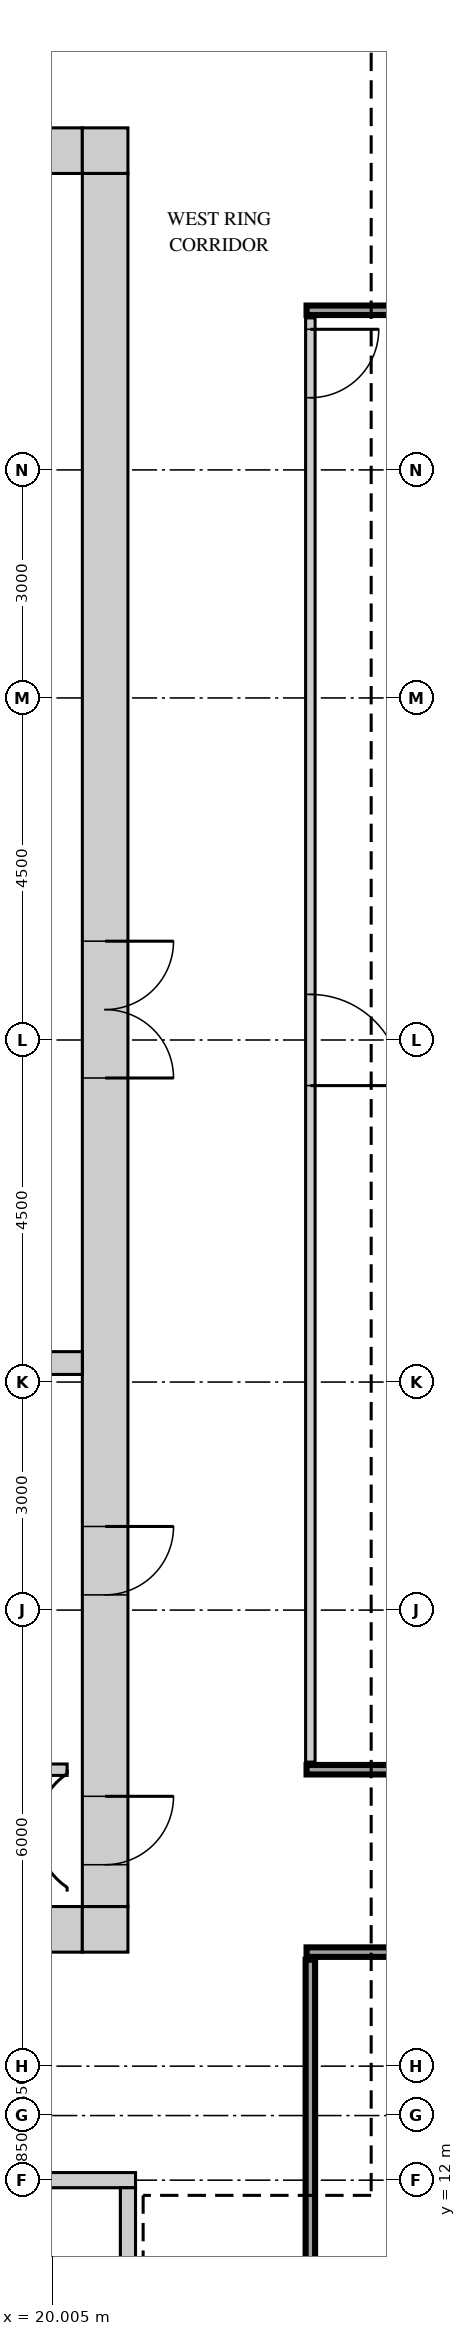
"""IFC4 building model, lengths in metres.
Left out: names, types, materials, properties, quantities, classifications, styles, units other than length and angle.
Written with IfcOpenShell. Run it as: python <this file> out.ifc"""

import sys

from ifc_helpers import new_model, si_unit, direction, frame, frame_2d, origin, place, context, subcontext, project, spatial, rectangle, extrude, source, transform, mapped, element, fill, save


model = new_model("IFC4")
c1 = context("Model", 3, precision=1e-05, world=origin(), true_north=direction((0.0, 1.0)))
c2 = subcontext(c1, "Body", "Model", "MODEL_VIEW")
j1 = project(units=[si_unit("LENGTHUNIT", "METRE"), si_unit("PLANEANGLEUNIT", "RADIAN")], contexts=[c1])
p1 = place(None, origin())
s1 = spatial("IfcSite", under=j1, at=p1, CompositionType="ELEMENT")
p2 = place(p1, origin())
s2 = spatial("IfcBuilding", under=s1, at=p2, CompositionType="ELEMENT")
p3 = place(p2, frame((0.0, 0.0, 318.2)))
s3 = spatial("IfcBuildingStorey", under=s2, at=p3, CompositionType="ELEMENT", Elevation=318.2)
m1 = source(origin(), c2, "Body", "SweptSolid", [
    extrude(rectangle(XDim=14.4, YDim=0.6, at=frame_2d((7.2, 0.0))), origin(), (0.0, 0.0, 1.0), 3.75),
])
p4 = place(p3, frame((6.0, 38.7, 0.0), z_axis=(0.0, 0.0, 1.0), x_axis=(1.0, 0.0, 0.0)))
e1 = element("IfcWall", 1, at=p4, inside=s3, PredefinedType="SHEAR", context=c2, shape_type="MappedRepresentation", body=[
    mapped(m1, transform((0.0, 0.0, 0.0))),
])
m2 = source(origin(), c2, "Body", "SweptSolid", [
    extrude(rectangle(XDim=0.9, YDim=2.1, at=frame_2d((0.45, 1.05))), frame((0.0, 0.31, 0.0), z_axis=(0.0, -1.0, 0.0), x_axis=(1.0, 0.0, 0.0)), (0.0, 0.0, 1.0), 0.62),
])
p5 = place(p4, frame((2.05, 0.0, 0.0)))
e2 = element("IfcOpeningElement", 2, at=p5, cuts=e1, PredefinedType="OPENING", context=c2, shape_type="MappedRepresentation", body=[
    mapped(m2, transform((0.0, 0.0, 0.0))),
])
p6 = place(p4, frame((5.45, 0.0, 0.0)))
e3 = element("IfcOpeningElement", 3, at=p6, cuts=e1, PredefinedType="OPENING", context=c2, shape_type="MappedRepresentation", body=[
    mapped(m2, transform((0.0, 0.0, 0.0))),
])
m3 = source(origin(), c2, "Body", "SweptSolid", [
    extrude(rectangle(XDim=1.0, YDim=2.1, at=frame_2d((0.5, 1.05))), frame((0.0, 0.31, 0.0), z_axis=(0.0, -1.0, 0.0), x_axis=(1.0, 0.0, 0.0)), (0.0, 0.0, 1.0), 0.62),
])
p7 = place(p4, frame((8.8, 0.0, 0.0)))
e4 = element("IfcOpeningElement", 4, at=p7, cuts=e1, PredefinedType="OPENING", context=c2, shape_type="MappedRepresentation", body=[
    mapped(m3, transform((0.0, 0.0, 0.0))),
])
p8 = place(p4, frame((12.15, 0.0, 0.0)))
e5 = element("IfcOpeningElement", 5, at=p8, cuts=e1, PredefinedType="OPENING", context=c2, shape_type="MappedRepresentation", body=[
    mapped(m2, transform((0.0, 0.0, 0.0))),
])
m4 = source(origin(), c2, "Body", "SweptSolid", [
    extrude(rectangle(XDim=0.6, YDim=0.6, at=frame_2d((0.3, 0.0))), origin(), (0.0, 0.0, 1.0), 3.75),
])
p9 = place(p3, frame((20.4, 38.7, 0.0), z_axis=(0.0, 0.0, 1.0), x_axis=(1.0, 0.0, 0.0)))
e6 = element("IfcWall", 6, at=p9, inside=s3, PredefinedType="SHEAR", context=c2, shape_type="MappedRepresentation", body=[
    mapped(m4, transform((0.0, 0.0, 0.0))),
])
p10 = place(p3, frame((6.0, 15.3, 0.0), z_axis=(0.0, 0.0, 1.0), x_axis=(1.0, 0.0, 0.0)))
e7 = element("IfcWall", 7, at=p10, inside=s3, PredefinedType="SHEAR", context=c2, shape_type="MappedRepresentation", body=[
    mapped(m1, transform((0.0, 0.0, 0.0))),
])
m5 = source(origin(), c2, "Body", "SweptSolid", [
    extrude(rectangle(XDim=1.2, YDim=2.1, at=frame_2d((0.6, 1.05))), frame((0.0, 0.31, 0.0), z_axis=(0.0, -1.0, 0.0), x_axis=(1.0, 0.0, 0.0)), (0.0, 0.0, 1.0), 0.62),
])
p11 = place(p10, frame((6.2, 0.0, 0.0)))
e8 = element("IfcOpeningElement", 8, at=p11, cuts=e7, PredefinedType="OPENING", context=c2, shape_type="MappedRepresentation", body=[
    mapped(m5, transform((0.0, 0.0, 0.0))),
])
p12 = place(p10, frame((2.85, 0.0, 0.0)))
e9 = element("IfcOpeningElement", 9, at=p12, cuts=e7, PredefinedType="OPENING", context=c2, shape_type="MappedRepresentation", body=[
    mapped(m5, transform((0.0, 0.0, 0.0))),
])
p13 = place(p10, frame((8.7, 0.0, 0.0)))
e10 = element("IfcOpeningElement", 10, at=p13, cuts=e7, PredefinedType="OPENING", context=c2, shape_type="MappedRepresentation", body=[
    mapped(m3, transform((0.0, 0.0, 0.0))),
])
p14 = place(p3, frame((20.4, 15.3, 0.0), z_axis=(0.0, 0.0, 1.0), x_axis=(1.0, 0.0, 0.0)))
e11 = element("IfcWall", 11, at=p14, inside=s3, PredefinedType="SHEAR", context=c2, shape_type="MappedRepresentation", body=[
    mapped(m4, transform((0.0, 0.0, 0.0))),
])
m6 = source(origin(), c2, "Body", "SweptSolid", [
    extrude(rectangle(XDim=22.8, YDim=0.6, at=frame_2d((11.4, 0.0))), origin(), (0.0, 0.0, 1.0), 3.75),
])
p15 = place(p3, frame((20.7, 15.6, 0.0), z_axis=(0.0, 0.0, 1.0), x_axis=(0.0, 1.0, 0.0)))
e12 = element("IfcWall", 12, at=p15, inside=s3, PredefinedType="SHEAR", context=c2, shape_type="MappedRepresentation", body=[
    mapped(m6, transform((0.0, 0.0, 0.0))),
])
m7 = source(origin(), c2, "Body", "SweptSolid", [
    extrude(rectangle(XDim=1.8, YDim=2.1, at=frame_2d((0.9, 1.05))), frame((0.0, 0.31, 0.0), z_axis=(0.0, -1.0, 0.0), x_axis=(1.0, 0.0, 0.0)), (0.0, 0.0, 1.0), 0.62),
])
p16 = place(p15, frame((10.9, 0.0, 0.0)))
e13 = element("IfcOpeningElement", 13, at=p16, cuts=e12, PredefinedType="OPENING", context=c2, shape_type="MappedRepresentation", body=[
    mapped(m7, transform((0.0, 0.0, 0.0))),
])
p17 = place(p15, frame((0.55, 0.0, 0.0)))
e14 = element("IfcOpeningElement", 14, at=p17, cuts=e12, PredefinedType="OPENING", context=c2, shape_type="MappedRepresentation", body=[
    mapped(m2, transform((0.0, 0.0, 0.0))),
])
p18 = place(p15, frame((4.1, 0.0, 0.0)))
e15 = element("IfcOpeningElement", 15, at=p18, cuts=e12, PredefinedType="OPENING", context=c2, shape_type="MappedRepresentation", body=[
    mapped(m2, transform((0.0, 0.0, 0.0))),
])
m8 = source(origin(), c2, "Body", "SweptSolid", [
    extrude(rectangle(XDim=7.2, YDim=0.2, at=frame_2d((3.6, 0.0))), origin(), (0.0, 0.0, 1.0), 3.75),
])
p19 = place(p3, frame((13.9, 12.0, 0.0), z_axis=(0.0, 0.0, 1.0), x_axis=(1.0, 0.0, 0.0)))
e16 = element("IfcWall", 16, at=p19, inside=s3, PredefinedType="SHEAR", context=c2, shape_type="MappedRepresentation", body=[
    mapped(m8, transform((0.0, 0.0, 0.0))),
])
m9 = source(origin(), c2, "Body", "SweptSolid", [
    extrude(rectangle(XDim=3.35, YDim=0.2, at=frame_2d((1.675, 0.0))), origin(), (0.0, 0.0, 1.0), 3.75),
])
p20 = place(p3, frame((21.0, 8.55, 0.0), z_axis=(0.0, 0.0, 1.0), x_axis=(0.0, 1.0, 0.0)))
e17 = element("IfcWall", 17, at=p20, inside=s3, PredefinedType="SHEAR", context=c2, shape_type="MappedRepresentation", body=[
    mapped(m9, transform((0.0, 0.0, 0.0))),
])
m10 = source(origin(), c2, "Body", "SweptSolid", [
    extrude(rectangle(XDim=13.2, YDim=0.3, at=frame_2d((6.6, 0.0))), origin(), (0.0, 0.0, 1.0), 3.75),
])
p21 = place(p3, frame((7.2, 22.75, 0.0), z_axis=(0.0, 0.0, 1.0), x_axis=(1.0, 0.0, 0.0)))
e18 = element("IfcWall", 18, at=p21, inside=s3, PredefinedType="STANDARD", context=c2, shape_type="MappedRepresentation", body=[
    mapped(m10, transform((0.0, 0.0, 0.0))),
])
m11 = source(origin(), c2, "Body", "SweptSolid", [
    extrude(rectangle(XDim=8.75, YDim=0.125, at=frame_2d((4.375, 0.0))), origin(), (0.0, 0.0, 1.0), 3.8),
])
p22 = place(p3, frame((23.4, 6.15, 0.0), z_axis=(0.0, 0.0, 1.0), x_axis=(0.0, 1.0, 0.0)))
e19 = element("IfcWall", 19, at=p22, inside=s3, PredefinedType="PARTITIONING", context=c2, shape_type="MappedRepresentation", body=[
    mapped(m11, transform((0.0, 0.0, 0.0))),
])
m12 = source(origin(), c2, "Body", "SweptSolid", [
    extrude(rectangle(XDim=19.1, YDim=0.125, at=frame_2d((9.55, 0.0))), origin(), (0.0, 0.0, 1.0), 3.8),
])
p23 = place(p3, frame((23.35, 15.0, 0.0), z_axis=(0.0, 0.0, 1.0), x_axis=(1.0, 0.0, 0.0)))
e20 = element("IfcWall", 20, at=p23, inside=s3, PredefinedType="PARTITIONING", context=c2, shape_type="MappedRepresentation", body=[
    mapped(m12, transform((0.0, 0.0, 0.0))),
])
m13 = source(origin(), c2, "Body", "SweptSolid", [
    extrude(rectangle(XDim=0.9, YDim=2.1, at=frame_2d((0.45, 1.05))), frame((0.0, 0.073, 0.0), z_axis=(0.0, -1.0, 0.0), x_axis=(1.0, 0.0, 0.0)), (0.0, 0.0, 1.0), 0.145),
])
p24 = place(p23, frame((5.3, 0.0, 0.0)))
e21 = element("IfcOpeningElement", 21, at=p24, cuts=e20, PredefinedType="OPENING", context=c2, shape_type="MappedRepresentation", body=[
    mapped(m13, transform((0.0, 0.0, 0.0))),
])
p25 = place(p23, frame((13.3, 0.0, 0.0)))
e22 = element("IfcOpeningElement", 22, at=p25, cuts=e20, PredefinedType="OPENING", context=c2, shape_type="MappedRepresentation", body=[
    mapped(m13, transform((0.0, 0.0, 0.0))),
])
m14 = source(origin(), c2, "Body", "SweptSolid", [
    extrude(rectangle(XDim=4.0, YDim=0.15, at=frame_2d((2.0, 0.0))), origin(), (0.0, 0.0, 1.0), 3.8),
])
p26 = place(p3, frame((16.2, 17.4, 0.0), z_axis=(0.0, 0.0, 1.0), x_axis=(1.0, 0.0, 0.0)))
e23 = element("IfcWall", 23, at=p26, inside=s3, PredefinedType="PARTITIONING", context=c2, shape_type="MappedRepresentation", body=[
    mapped(m14, transform((0.0, 0.0, 0.0))),
])
m15 = source(origin(), c2, "Body", "SweptSolid", [
    extrude(rectangle(XDim=16.7, YDim=0.125, at=frame_2d((8.35, 0.0))), origin(), (0.0, 0.0, 1.0), 3.8),
])
p27 = place(p3, frame((23.35, 17.4, 0.0), z_axis=(0.0, 0.0, 1.0), x_axis=(1.0, 0.0, 0.0)))
e24 = element("IfcWall", 24, at=p27, inside=s3, PredefinedType="PARTITIONING", context=c2, shape_type="MappedRepresentation", body=[
    mapped(m15, transform((0.0, 0.0, 0.0))),
])
m16 = source(origin(), c2, "Body", "SweptSolid", [
    extrude(rectangle(XDim=19.0, YDim=0.125, at=frame_2d((9.5, 0.0))), origin(), (0.0, 0.0, 1.0), 3.8),
])
p28 = place(p3, frame((23.4, 17.5, 0.0), z_axis=(0.0, 0.0, 1.0), x_axis=(0.0, 1.0, 0.0)))
e25 = element("IfcWall", 25, at=p28, inside=s3, PredefinedType="PARTITIONING", context=c2, shape_type="MappedRepresentation", body=[
    mapped(m16, transform((0.0, 0.0, 0.0))),
])
m17 = source(origin(), c2, "Body", "SweptSolid", [
    extrude(rectangle(XDim=1.2, YDim=2.1, at=frame_2d((0.6, 1.05))), frame((0.0, 0.073, 0.0), z_axis=(0.0, -1.0, 0.0), x_axis=(1.0, 0.0, 0.0)), (0.0, 0.0, 1.0), 0.145),
])
p29 = place(p28, frame((8.9, 0.0, 0.0)))
e26 = element("IfcOpeningElement", 26, at=p29, cuts=e25, PredefinedType="OPENING", context=c2, shape_type="MappedRepresentation", body=[
    mapped(m17, transform((0.0, 0.0, 0.0))),
])
p30 = place(p28, frame((17.95, 0.0, 0.0)))
e27 = element("IfcOpeningElement", 27, at=p30, cuts=e25, PredefinedType="OPENING", context=c2, shape_type="MappedRepresentation", body=[
    mapped(m13, transform((0.0, 0.0, 0.0))),
])
p31 = place(p3, frame((23.35, 36.6, 0.0), z_axis=(0.0, 0.0, 1.0), x_axis=(1.0, 0.0, 0.0)))
e28 = element("IfcWall", 28, at=p31, inside=s3, PredefinedType="PARTITIONING", context=c2, shape_type="MappedRepresentation", body=[
    mapped(m15, transform((0.0, 0.0, 0.0))),
])
m18 = source(origin(), c2, "Body", "SweptSolid", [
    extrude(rectangle(XDim=1.8, YDim=2.1, at=frame_2d((0.9, 1.05))), frame((0.0, 0.25, 0.0), z_axis=(0.0, -1.0, 0.0), x_axis=(1.0, 0.0, 0.0)), (0.0, 0.0, 1.0), 0.5),
])
p32 = place(p16, origin())
e29 = element("IfcDoor", 29, at=p32, inside=s3, OperationType="DOUBLE_DOOR_SINGLE_SWING", PredefinedType="DOOR", context=c2, shape_type="MappedRepresentation", body=[
    mapped(m18, transform((0.0, 0.0, 0.0))),
])
fill(e13, e29)
m19 = source(origin(), c2, "Body", "SweptSolid", [
    extrude(rectangle(XDim=0.9, YDim=2.1, at=frame_2d((0.45, 1.05))), frame((0.0, 0.25, 0.0), z_axis=(0.0, -1.0, 0.0), x_axis=(1.0, 0.0, 0.0)), (0.0, 0.0, 1.0), 0.5),
])
p33 = place(p17, origin())
e30 = element("IfcDoor", 30, at=p33, inside=s3, OperationType="SINGLE_SWING_RIGHT", PredefinedType="DOOR", context=c2, shape_type="MappedRepresentation", body=[
    mapped(m19, transform((0.0, 0.0, 0.0))),
])
fill(e14, e30)
p34 = place(p18, origin())
e31 = element("IfcDoor", 31, at=p34, inside=s3, OperationType="SINGLE_SWING_RIGHT", PredefinedType="DOOR", context=c2, shape_type="MappedRepresentation", body=[
    mapped(m19, transform((0.0, 0.0, 0.0))),
])
fill(e15, e31)
m20 = source(origin(), c2, "Body", "SweptSolid", [
    extrude(rectangle(XDim=1.2, YDim=2.1, at=frame_2d((0.6, 1.05))), frame((0.0, 0.025, 0.0), z_axis=(0.0, -1.0, 0.0), x_axis=(1.0, 0.0, 0.0)), (0.0, 0.0, 1.0), 0.05),
])
p35 = place(p29, origin())
e32 = element("IfcDoor", 32, at=p35, inside=s3, OperationType="SINGLE_SWING_LEFT", PredefinedType="DOOR", context=c2, shape_type="MappedRepresentation", body=[
    mapped(m20, transform((0.0, 0.0, 0.0))),
])
fill(e26, e32)
m21 = source(origin(), c2, "Body", "SweptSolid", [
    extrude(rectangle(XDim=0.9, YDim=2.1, at=frame_2d((0.45, 1.05))), frame((0.0, 0.025, 0.0), z_axis=(0.0, -1.0, 0.0), x_axis=(1.0, 0.0, 0.0)), (0.0, 0.0, 1.0), 0.05),
])
p36 = place(p30, origin())
e33 = element("IfcDoor", 33, at=p36, inside=s3, OperationType="SINGLE_SWING_RIGHT", PredefinedType="DOOR", context=c2, shape_type="MappedRepresentation", body=[
    mapped(m21, transform((0.0, 0.0, 0.0))),
])
fill(e27, e33)
save(model, sys.argv[1])
